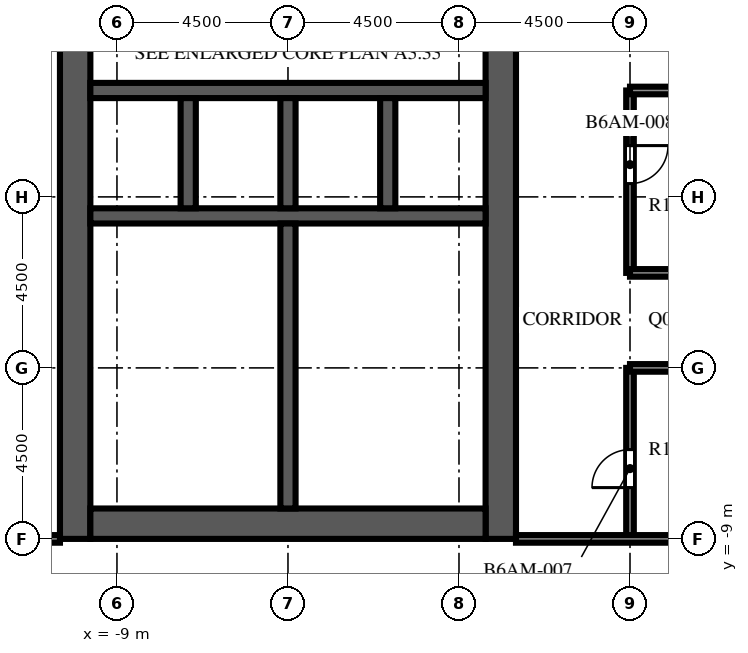
"""IFC4 building model, lengths in metres.
Left out: names, types, materials, properties, quantities, classifications, styles, units other than length and angle.
Written with IfcOpenShell. Run it as: python <this file> out.ifc"""

import sys

from ifc_helpers import new_model, si_unit, direction, frame, frame_2d, origin, place, context, subcontext, project, spatial, rectangle, extrude, element, fill, save


model = new_model("IFC4")
c1 = context("Model", 3, precision=1e-05, world=origin(), true_north=direction((0.0, 1.0)))
c2 = subcontext(c1, "Body", "Model", "MODEL_VIEW")
j1 = project(units=[si_unit("LENGTHUNIT", "METRE"), si_unit("PLANEANGLEUNIT", "RADIAN")], contexts=[c1])
p1 = place(None, origin())
s1 = spatial("IfcSite", under=j1, at=p1, CompositionType="ELEMENT")
p2 = place(p1, origin())
s2 = spatial("IfcBuilding", under=s1, at=p2, CompositionType="ELEMENT")
p3 = place(p2, frame((0.0, 0.0, 220.2)))
s3 = spatial("IfcBuildingStorey", under=s2, at=p3, CompositionType="ELEMENT", Elevation=220.2)
p4 = place(p3, frame((-10.1, -9.0, 0.0), z_axis=(0.0, 0.0, 1.0), x_axis=(0.0, 1.0, 0.0)))
e1 = element("IfcWall", 1, at=p4, inside=s3, PredefinedType="SHEAR", context=c2, shape_type="SweptSolid", body=[
    extrude(rectangle(XDim=27.5, YDim=0.8, at=frame_2d((13.75, 0.0))), origin(), (0.0, 0.0, 1.0), 6.0),
])
p5 = place(p4, frame((12.55, 0.0, 0.0)))
e2 = element("IfcOpeningElement", 2, at=p5, cuts=e1, PredefinedType="OPENING", context=c2, shape_type="SweptSolid", body=[
    extrude(rectangle(XDim=2.4, YDim=2.4, at=frame_2d((1.2, 1.2))), frame((0.0, 0.41, 0.0), z_axis=(0.0, -1.0, 0.0), x_axis=(1.0, 0.0, 0.0)), (0.0, 0.0, 1.0), 0.82),
])
p6 = place(p4, frame((6.825, 0.0, 0.0)))
e3 = element("IfcOpeningElement", 3, at=p6, cuts=e1, PredefinedType="OPENING", context=c2, shape_type="SweptSolid", body=[
    extrude(rectangle(XDim=1.2, YDim=2.1, at=frame_2d((0.6, 1.05))), frame((0.0, 0.41, 0.0), z_axis=(0.0, -1.0, 0.0), x_axis=(1.0, 0.0, 0.0)), (0.0, 0.0, 1.0), 0.82),
])
p7 = place(p4, frame((19.475, 0.0, 0.0)))
e4 = element("IfcOpeningElement", 4, at=p7, cuts=e1, PredefinedType="OPENING", context=c2, shape_type="SweptSolid", body=[
    extrude(rectangle(XDim=1.2, YDim=2.1, at=frame_2d((0.6, 1.05))), frame((0.0, 0.41, 0.0), z_axis=(0.0, -1.0, 0.0), x_axis=(1.0, 0.0, 0.0)), (0.0, 0.0, 1.0), 0.82),
])
p8 = place(p3, frame((1.1, -9.0, 0.0), z_axis=(0.0, 0.0, 1.0), x_axis=(0.0, 1.0, 0.0)))
e5 = element("IfcWall", 5, at=p8, inside=s3, PredefinedType="SHEAR", context=c2, shape_type="SweptSolid", body=[
    extrude(rectangle(XDim=27.5, YDim=0.8, at=frame_2d((13.75, 0.0))), origin(), (0.0, 0.0, 1.0), 6.0),
])
p9 = place(p8, frame((12.55, 0.0, 0.0)))
e6 = element("IfcOpeningElement", 6, at=p9, cuts=e5, PredefinedType="OPENING", context=c2, shape_type="SweptSolid", body=[
    extrude(rectangle(XDim=2.4, YDim=2.4, at=frame_2d((1.2, 1.2))), frame((0.0, 0.41, 0.0), z_axis=(0.0, -1.0, 0.0), x_axis=(1.0, 0.0, 0.0)), (0.0, 0.0, 1.0), 0.82),
])
p10 = place(p8, frame((5.5, 0.0, 0.0)))
e7 = element("IfcOpeningElement", 7, at=p10, cuts=e5, PredefinedType="OPENING", context=c2, shape_type="SweptSolid", body=[
    extrude(rectangle(XDim=0.95, YDim=2.1, at=frame_2d((0.475, 1.05))), frame((0.0, 0.41, 0.0), z_axis=(0.0, -1.0, 0.0), x_axis=(1.0, 0.0, 0.0)), (0.0, 0.0, 1.0), 0.82),
])
p11 = place(p8, frame((23.475, 0.0, 0.0)))
e8 = element("IfcOpeningElement", 8, at=p11, cuts=e5, PredefinedType="OPENING", context=c2, shape_type="SweptSolid", body=[
    extrude(rectangle(XDim=1.2, YDim=2.1, at=frame_2d((0.6, 1.05))), frame((0.0, 0.41, 0.0), z_axis=(0.0, -1.0, 0.0), x_axis=(1.0, 0.0, 0.0)), (0.0, 0.0, 1.0), 0.82),
])
p12 = place(p3, frame((-9.7, -8.6, 0.0), z_axis=(0.0, 0.0, 1.0), x_axis=(1.0, 0.0, 0.0)))
e9 = element("IfcWall", 9, at=p12, inside=s3, PredefinedType="SHEAR", context=c2, shape_type="SweptSolid", body=[
    extrude(rectangle(XDim=10.4, YDim=0.8, at=frame_2d((5.2, 0.0))), origin(), (0.0, 0.0, 1.0), 6.0),
])
p13 = place(p3, frame((-9.7, -0.5, 0.0), z_axis=(0.0, 0.0, 1.0), x_axis=(1.0, 0.0, 0.0)))
e10 = element("IfcWall", 10, at=p13, inside=s3, PredefinedType="SHEAR", context=c2, shape_type="SweptSolid", body=[
    extrude(rectangle(XDim=10.4, YDim=0.4, at=frame_2d((5.2, 0.0))), origin(), (0.0, 0.0, 1.0), 6.0),
])
p14 = place(p3, frame((-9.7, 2.8, 0.0), z_axis=(0.0, 0.0, 1.0), x_axis=(1.0, 0.0, 0.0)))
e11 = element("IfcWall", 11, at=p14, inside=s3, PredefinedType="SHEAR", context=c2, shape_type="SweptSolid", body=[
    extrude(rectangle(XDim=10.4, YDim=0.4, at=frame_2d((5.2, 0.0))), origin(), (0.0, 0.0, 1.0), 6.0),
])
p15 = place(p14, frame((0.738, 0.0, 0.0)))
e12 = element("IfcOpeningElement", 12, at=p15, cuts=e11, PredefinedType="OPENING", context=c2, shape_type="SweptSolid", body=[
    extrude(rectangle(XDim=1.1, YDim=2.1, at=frame_2d((0.55, 1.05))), frame((0.0, 0.21, 0.0), z_axis=(0.0, -1.0, 0.0), x_axis=(1.0, 0.0, 0.0)), (0.0, 0.0, 1.0), 0.42),
])
p16 = place(p14, frame((3.337, 0.0, 0.0)))
e13 = element("IfcOpeningElement", 13, at=p16, cuts=e11, PredefinedType="OPENING", context=c2, shape_type="SweptSolid", body=[
    extrude(rectangle(XDim=1.1, YDim=2.1, at=frame_2d((0.55, 1.05))), frame((0.0, 0.21, 0.0), z_axis=(0.0, -1.0, 0.0), x_axis=(1.0, 0.0, 0.0)), (0.0, 0.0, 1.0), 0.42),
])
p17 = place(p14, frame((6.012, 0.0, 0.0)))
e14 = element("IfcOpeningElement", 14, at=p17, cuts=e11, PredefinedType="OPENING", context=c2, shape_type="SweptSolid", body=[
    extrude(rectangle(XDim=1.0, YDim=2.1, at=frame_2d((0.5, 1.05))), frame((0.0, 0.21, 0.0), z_axis=(0.0, -1.0, 0.0), x_axis=(1.0, 0.0, 0.0)), (0.0, 0.0, 1.0), 0.42),
])
p18 = place(p14, frame((8.613, 0.0, 0.0)))
e15 = element("IfcOpeningElement", 15, at=p18, cuts=e11, PredefinedType="OPENING", context=c2, shape_type="SweptSolid", body=[
    extrude(rectangle(XDim=1.0, YDim=2.1, at=frame_2d((0.5, 1.05))), frame((0.0, 0.21, 0.0), z_axis=(0.0, -1.0, 0.0), x_axis=(1.0, 0.0, 0.0)), (0.0, 0.0, 1.0), 0.42),
])
for number, where, z_axis, x_axis in (
    (16, (-7.125, -0.3, 0.0), (0.0, 0.0, 1.0), (0.0, 1.0, 0.0)),
    (17, (-4.5, -0.3, 0.0), (0.0, 0.0, 1.0), (0.0, 1.0, 0.0)),
    (18, (-1.875, -0.3, 0.0), (0.0, 0.0, 1.0), (0.0, 1.0, 0.0)),
):
    element("IfcWall", number, at=place(p3, frame(where, z_axis=z_axis, x_axis=x_axis)), inside=s3, PredefinedType="SHEAR", context=c2, shape_type="SweptSolid", body=[
        extrude(rectangle(XDim=2.9, YDim=0.4, at=frame_2d((1.45, 0.0))), origin(), (0.0, 0.0, 1.0), 6.0),
    ])
p19 = place(p3, frame((-4.5, -8.2, 0.0), z_axis=(0.0, 0.0, 1.0), x_axis=(0.0, 1.0, 0.0)))
e19 = element("IfcWall", 19, at=p19, inside=s3, PredefinedType="SHEAR", context=c2, shape_type="SweptSolid", body=[
    extrude(rectangle(XDim=7.5, YDim=0.4, at=frame_2d((3.75, 0.0))), origin(), (0.0, 0.0, 1.0), 6.0),
])
p20 = place(p3, frame((-1.8, -3.7, 0.0), z_axis=(0.0, 0.0, 1.0), x_axis=(1.0, 0.0, 0.0)))
e20 = element("IfcWall", 20, at=p20, inside=s3, PredefinedType="PARTITIONING", context=c2, shape_type="SweptSolid", body=[
    extrude(rectangle(XDim=2.5, YDim=0.1, at=frame_2d((1.25, 0.0))), origin(), (0.0, 0.0, 1.0), 5.4),
])
p21 = place(p20, frame((0.75, 0.0, 0.0)))
e21 = element("IfcOpeningElement", 21, at=p21, cuts=e20, PredefinedType="OPENING", context=c2, shape_type="SweptSolid", body=[
    extrude(rectangle(XDim=1.0, YDim=2.1, at=frame_2d((0.5, 1.05))), frame((0.0, 0.06, 0.0), z_axis=(0.0, -1.0, 0.0), x_axis=(1.0, 0.0, 0.0)), (0.0, 0.0, 1.0), 0.12),
])
p22 = place(p3, frame((-4.3, -3.7, 0.0), z_axis=(0.0, 0.0, 1.0), x_axis=(1.0, 0.0, 0.0)))
e22 = element("IfcWall", 22, at=p22, inside=s3, PredefinedType="PARTITIONING", context=c2, shape_type="SweptSolid", body=[
    extrude(rectangle(XDim=2.5, YDim=0.1, at=frame_2d((1.25, 0.0))), origin(), (0.0, 0.0, 1.0), 5.4),
])
p23 = place(p22, frame((0.75, 0.0, 0.0)))
e23 = element("IfcOpeningElement", 23, at=p23, cuts=e22, PredefinedType="OPENING", context=c2, shape_type="SweptSolid", body=[
    extrude(rectangle(XDim=1.0, YDim=2.1, at=frame_2d((0.5, 1.05))), frame((0.0, 0.06, 0.0), z_axis=(0.0, -1.0, 0.0), x_axis=(1.0, 0.0, 0.0)), (0.0, 0.0, 1.0), 0.12),
])
p24 = place(p3, frame((-1.8, -2.35, 0.0), z_axis=(0.0, 0.0, 1.0), x_axis=(1.0, 0.0, 0.0)))
e24 = element("IfcWall", 24, at=p24, inside=s3, PredefinedType="PARTITIONING", context=c2, shape_type="SweptSolid", body=[
    extrude(rectangle(XDim=2.5, YDim=0.1, at=frame_2d((1.25, 0.0))), origin(), (0.0, 0.0, 1.0), 5.4),
])
p25 = place(p24, frame((0.75, 0.0, 0.0)))
e25 = element("IfcOpeningElement", 25, at=p25, cuts=e24, PredefinedType="OPENING", context=c2, shape_type="SweptSolid", body=[
    extrude(rectangle(XDim=1.0, YDim=2.1, at=frame_2d((0.5, 1.05))), frame((0.0, 0.06, 0.0), z_axis=(0.0, -1.0, 0.0), x_axis=(1.0, 0.0, 0.0)), (0.0, 0.0, 1.0), 0.12),
])
p26 = place(p3, frame((-4.3, -2.35, 0.0), z_axis=(0.0, 0.0, 1.0), x_axis=(1.0, 0.0, 0.0)))
e26 = element("IfcWall", 26, at=p26, inside=s3, PredefinedType="PARTITIONING", context=c2, shape_type="SweptSolid", body=[
    extrude(rectangle(XDim=2.5, YDim=0.1, at=frame_2d((1.25, 0.0))), origin(), (0.0, 0.0, 1.0), 5.4),
])
p27 = place(p26, frame((0.75, 0.0, 0.0)))
e27 = element("IfcOpeningElement", 27, at=p27, cuts=e26, PredefinedType="OPENING", context=c2, shape_type="SweptSolid", body=[
    extrude(rectangle(XDim=1.0, YDim=2.1, at=frame_2d((0.5, 1.05))), frame((0.0, 0.06, 0.0), z_axis=(0.0, -1.0, 0.0), x_axis=(1.0, 0.0, 0.0)), (0.0, 0.0, 1.0), 0.12),
])
p28 = place(p3, frame((-1.8, -8.2, 0.0), z_axis=(0.0, 0.0, 1.0), x_axis=(0.0, 1.0, 0.0)))
e28 = element("IfcWall", 28, at=p28, inside=s3, PredefinedType="PARTITIONING", context=c2, shape_type="SweptSolid", body=[
    extrude(rectangle(XDim=4.5, YDim=0.1, at=frame_2d((2.25, 0.0))), origin(), (0.0, 0.0, 1.0), 5.4),
])
p29 = place(p3, frame((-1.8, -2.35, 0.0), z_axis=(0.0, 0.0, 1.0), x_axis=(0.0, 1.0, 0.0)))
e29 = element("IfcWall", 29, at=p29, inside=s3, PredefinedType="PARTITIONING", context=c2, shape_type="SweptSolid", body=[
    extrude(rectangle(XDim=1.65, YDim=0.1, at=frame_2d((0.825, 0.0))), origin(), (0.0, 0.0, 1.0), 5.4),
])
p30 = place(p3, frame((4.5, -4.5, 0.0), z_axis=(0.0, 0.0, 1.0), x_axis=(0.0, -1.0, 0.0)))
e30 = element("IfcWall", 30, at=p30, inside=s3, PredefinedType="PARTITIONING", context=c2, shape_type="SweptSolid", body=[
    extrude(rectangle(XDim=4.5, YDim=0.2, at=frame_2d((2.25, 0.0))), origin(), (0.0, 0.0, 1.0), 5.4),
])
p31 = place(p30, frame((2.15, 0.0, 0.0)))
e31 = element("IfcOpeningElement", 31, at=p31, cuts=e30, PredefinedType="OPENING", context=c2, shape_type="SweptSolid", body=[
    extrude(rectangle(XDim=1.0, YDim=2.1, at=frame_2d((0.5, 1.05))), frame((0.0, 0.11, 0.0), z_axis=(0.0, -1.0, 0.0), x_axis=(1.0, 0.0, 0.0)), (0.0, 0.0, 1.0), 0.22),
])
p32 = place(p3, frame((4.5, 2.8, 0.0), z_axis=(0.0, 0.0, 1.0), x_axis=(0.0, -1.0, 0.0)))
e32 = element("IfcWall", 32, at=p32, inside=s3, PredefinedType="PARTITIONING", context=c2, shape_type="SweptSolid", body=[
    extrude(rectangle(XDim=4.8, YDim=0.2, at=frame_2d((2.4, 0.0))), origin(), (0.0, 0.0, 1.0), 5.4),
])
p33 = place(p32, frame((1.45, 0.0, 0.0)))
e33 = element("IfcOpeningElement", 33, at=p33, cuts=e32, PredefinedType="OPENING", context=c2, shape_type="SweptSolid", body=[
    extrude(rectangle(XDim=1.0, YDim=2.1, at=frame_2d((0.5, 1.05))), frame((0.0, 0.11, 0.0), z_axis=(0.0, -1.0, 0.0), x_axis=(1.0, 0.0, 0.0)), (0.0, 0.0, 1.0), 0.22),
])
p34 = place(p3, frame((-10.5, -9.0, 0.0), z_axis=(0.0, 0.0, 1.0), x_axis=(-1.0, 0.0, 0.0)))
e34 = element("IfcWall", 34, at=p34, inside=s3, PredefinedType="PARTITIONING", context=c2, shape_type="SweptSolid", body=[
    extrude(rectangle(XDim=3.0, YDim=0.2, at=frame_2d((1.5, 0.0))), origin(), (0.0, 0.0, 1.0), 5.4),
])
p35 = place(p34, frame((0.65, 0.0, 0.0)))
e35 = element("IfcOpeningElement", 35, at=p35, cuts=e34, PredefinedType="OPENING", context=c2, shape_type="SweptSolid", body=[
    extrude(rectangle(XDim=1.0, YDim=2.1, at=frame_2d((0.5, 1.05))), frame((0.0, 0.11, 0.0), z_axis=(0.0, -1.0, 0.0), x_axis=(1.0, 0.0, 0.0)), (0.0, 0.0, 1.0), 0.22),
])
p36 = place(p3, frame((1.5, -9.0, 0.0), z_axis=(0.0, 0.0, 1.0), x_axis=(1.0, 0.0, 0.0)))
e36 = element("IfcWall", 36, at=p36, inside=s3, PredefinedType="PARTITIONING", context=c2, shape_type="SweptSolid", body=[
    extrude(rectangle(XDim=4.5, YDim=0.2, at=frame_2d((2.25, 0.0))), origin(), (0.0, 0.0, 1.0), 5.4),
])
for number, where, z_axis, x_axis in (
    (37, (4.5, -4.5, 0.0), (0.0, 0.0, 1.0), (1.0, 0.0, 0.0)),
    (38, (4.5, -2.0, 0.0), (0.0, 0.0, 1.0), (1.0, 0.0, 0.0)),
    (39, (4.5, 2.8, 0.0), (0.0, 0.0, 1.0), (1.0, 0.0, 0.0)),
):
    element("IfcWall", number, at=place(p3, frame(where, z_axis=z_axis, x_axis=x_axis)), inside=s3, PredefinedType="PARTITIONING", context=c2, shape_type="SweptSolid", body=[
        extrude(rectangle(XDim=1.5, YDim=0.2, at=frame_2d((0.75, 0.0))), origin(), (0.0, 0.0, 1.0), 5.4),
    ])
p37 = place(p15, origin())
e40 = element("IfcDoor", 40, at=p37, inside=s3, OperationType="DOUBLE_DOOR_SLIDING", PredefinedType="DOOR", context=c2, shape_type="SweptSolid", body=[
    extrude(rectangle(XDim=1.1, YDim=2.1, at=frame_2d((0.55, 1.05))), frame((0.0, 0.025, 0.0), z_axis=(0.0, -1.0, 0.0), x_axis=(1.0, 0.0, 0.0)), (0.0, 0.0, 1.0), 0.05),
])
fill(e12, e40)
p38 = place(p16, origin())
e41 = element("IfcDoor", 41, at=p38, inside=s3, OperationType="DOUBLE_DOOR_SLIDING", PredefinedType="DOOR", context=c2, shape_type="SweptSolid", body=[
    extrude(rectangle(XDim=1.1, YDim=2.1, at=frame_2d((0.55, 1.05))), frame((0.0, 0.025, 0.0), z_axis=(0.0, -1.0, 0.0), x_axis=(1.0, 0.0, 0.0)), (0.0, 0.0, 1.0), 0.05),
])
fill(e13, e41)
p39 = place(p5, origin())
e42 = element("IfcDoor", 42, at=p39, inside=s3, OperationType="DOUBLE_DOOR_DOUBLE_SWING", PredefinedType="DOOR", context=c2, shape_type="SweptSolid", body=[
    extrude(rectangle(XDim=2.4, YDim=2.4, at=frame_2d((1.2, 1.2))), frame((0.0, 0.025, 0.0), z_axis=(0.0, -1.0, 0.0), x_axis=(1.0, 0.0, 0.0)), (0.0, 0.0, 1.0), 0.05),
])
fill(e2, e42)
p40 = place(p9, origin())
e43 = element("IfcDoor", 43, at=p40, inside=s3, OperationType="DOUBLE_DOOR_DOUBLE_SWING", PredefinedType="DOOR", context=c2, shape_type="SweptSolid", body=[
    extrude(rectangle(XDim=2.4, YDim=2.4, at=frame_2d((1.2, 1.2))), frame((0.0, 0.025, 0.0), z_axis=(0.0, -1.0, 0.0), x_axis=(1.0, 0.0, 0.0)), (0.0, 0.0, 1.0), 0.05),
])
fill(e6, e43)
p41 = place(p6, origin())
e44 = element("IfcDoor", 44, at=p41, inside=s3, OperationType="SINGLE_SWING_LEFT", PredefinedType="DOOR", context=c2, shape_type="SweptSolid", body=[
    extrude(rectangle(XDim=1.2, YDim=2.1, at=frame_2d((0.6, 1.05))), frame((0.0, 0.025, 0.0), z_axis=(0.0, -1.0, 0.0), x_axis=(1.0, 0.0, 0.0)), (0.0, 0.0, 1.0), 0.05),
])
fill(e3, e44)
p42 = place(p17, origin())
e45 = element("IfcDoor", 45, at=p42, inside=s3, OperationType="SINGLE_SWING_LEFT", PredefinedType="DOOR", context=c2, shape_type="SweptSolid", body=[
    extrude(rectangle(XDim=1.0, YDim=2.1, at=frame_2d((0.5, 1.05))), frame((0.0, 0.025, 0.0), z_axis=(0.0, -1.0, 0.0), x_axis=(1.0, 0.0, 0.0)), (0.0, 0.0, 1.0), 0.05),
])
fill(e14, e45)
p43 = place(p18, origin())
e46 = element("IfcDoor", 46, at=p43, inside=s3, OperationType="SINGLE_SWING_RIGHT", PredefinedType="DOOR", context=c2, shape_type="SweptSolid", body=[
    extrude(rectangle(XDim=1.0, YDim=2.1, at=frame_2d((0.5, 1.05))), frame((0.0, 0.025, 0.0), z_axis=(0.0, -1.0, 0.0), x_axis=(1.0, 0.0, 0.0)), (0.0, 0.0, 1.0), 0.05),
])
fill(e15, e46)
p44 = place(p10, origin())
e47 = element("IfcDoor", 47, at=p44, inside=s3, OperationType="SINGLE_SWING_LEFT", PredefinedType="DOOR", context=c2, shape_type="SweptSolid", body=[
    extrude(rectangle(XDim=0.95, YDim=2.1, at=frame_2d((0.475, 1.05))), frame((0.0, 0.375, 0.0), z_axis=(0.0, -1.0, 0.0), x_axis=(1.0, 0.0, 0.0)), (0.0, 0.0, 1.0), 0.05),
])
fill(e7, e47)
p45 = place(p21, origin())
e48 = element("IfcDoor", 48, at=p45, inside=s3, OperationType="SINGLE_SWING_RIGHT", PredefinedType="DOOR", context=c2, shape_type="SweptSolid", body=[
    extrude(rectangle(XDim=1.0, YDim=2.1, at=frame_2d((0.5, 1.05))), frame((0.0, 0.025, 0.0), z_axis=(0.0, -1.0, 0.0), x_axis=(1.0, 0.0, 0.0)), (0.0, 0.0, 1.0), 0.05),
])
fill(e21, e48)
p46 = place(p23, origin())
e49 = element("IfcDoor", 49, at=p46, inside=s3, OperationType="SINGLE_SWING_LEFT", PredefinedType="DOOR", context=c2, shape_type="SweptSolid", body=[
    extrude(rectangle(XDim=1.0, YDim=2.1, at=frame_2d((0.5, 1.05))), frame((0.0, 0.025, 0.0), z_axis=(0.0, -1.0, 0.0), x_axis=(1.0, 0.0, 0.0)), (0.0, 0.0, 1.0), 0.05),
])
fill(e23, e49)
p47 = place(p25, origin())
e50 = element("IfcDoor", 50, at=p47, inside=s3, OperationType="SINGLE_SWING_RIGHT", PredefinedType="DOOR", context=c2, shape_type="SweptSolid", body=[
    extrude(rectangle(XDim=1.0, YDim=2.1, at=frame_2d((0.5, 1.05))), frame((0.0, 0.025, 0.0), z_axis=(0.0, -1.0, 0.0), x_axis=(1.0, 0.0, 0.0)), (0.0, 0.0, 1.0), 0.05),
])
fill(e25, e50)
p48 = place(p27, origin())
e51 = element("IfcDoor", 51, at=p48, inside=s3, OperationType="SINGLE_SWING_LEFT", PredefinedType="DOOR", context=c2, shape_type="SweptSolid", body=[
    extrude(rectangle(XDim=1.0, YDim=2.1, at=frame_2d((0.5, 1.05))), frame((0.0, 0.025, 0.0), z_axis=(0.0, -1.0, 0.0), x_axis=(1.0, 0.0, 0.0)), (0.0, 0.0, 1.0), 0.05),
])
fill(e27, e51)
p49 = place(p31, origin())
e52 = element("IfcDoor", 52, at=p49, inside=s3, OperationType="SINGLE_SWING_RIGHT", PredefinedType="DOOR", context=c2, shape_type="SweptSolid", body=[
    extrude(rectangle(XDim=1.0, YDim=2.1, at=frame_2d((0.5, 1.05))), frame((0.0, 0.025, 0.0), z_axis=(0.0, -1.0, 0.0), x_axis=(1.0, 0.0, 0.0)), (0.0, 0.0, 1.0), 0.05),
])
fill(e31, e52)
p50 = place(p33, origin())
e53 = element("IfcDoor", 53, at=p50, inside=s3, OperationType="SINGLE_SWING_LEFT", PredefinedType="DOOR", context=c2, shape_type="SweptSolid", body=[
    extrude(rectangle(XDim=1.0, YDim=2.1, at=frame_2d((0.5, 1.05))), frame((0.0, 0.025, 0.0), z_axis=(0.0, -1.0, 0.0), x_axis=(1.0, 0.0, 0.0)), (0.0, 0.0, 1.0), 0.05),
])
fill(e33, e53)
save(model, sys.argv[1])
